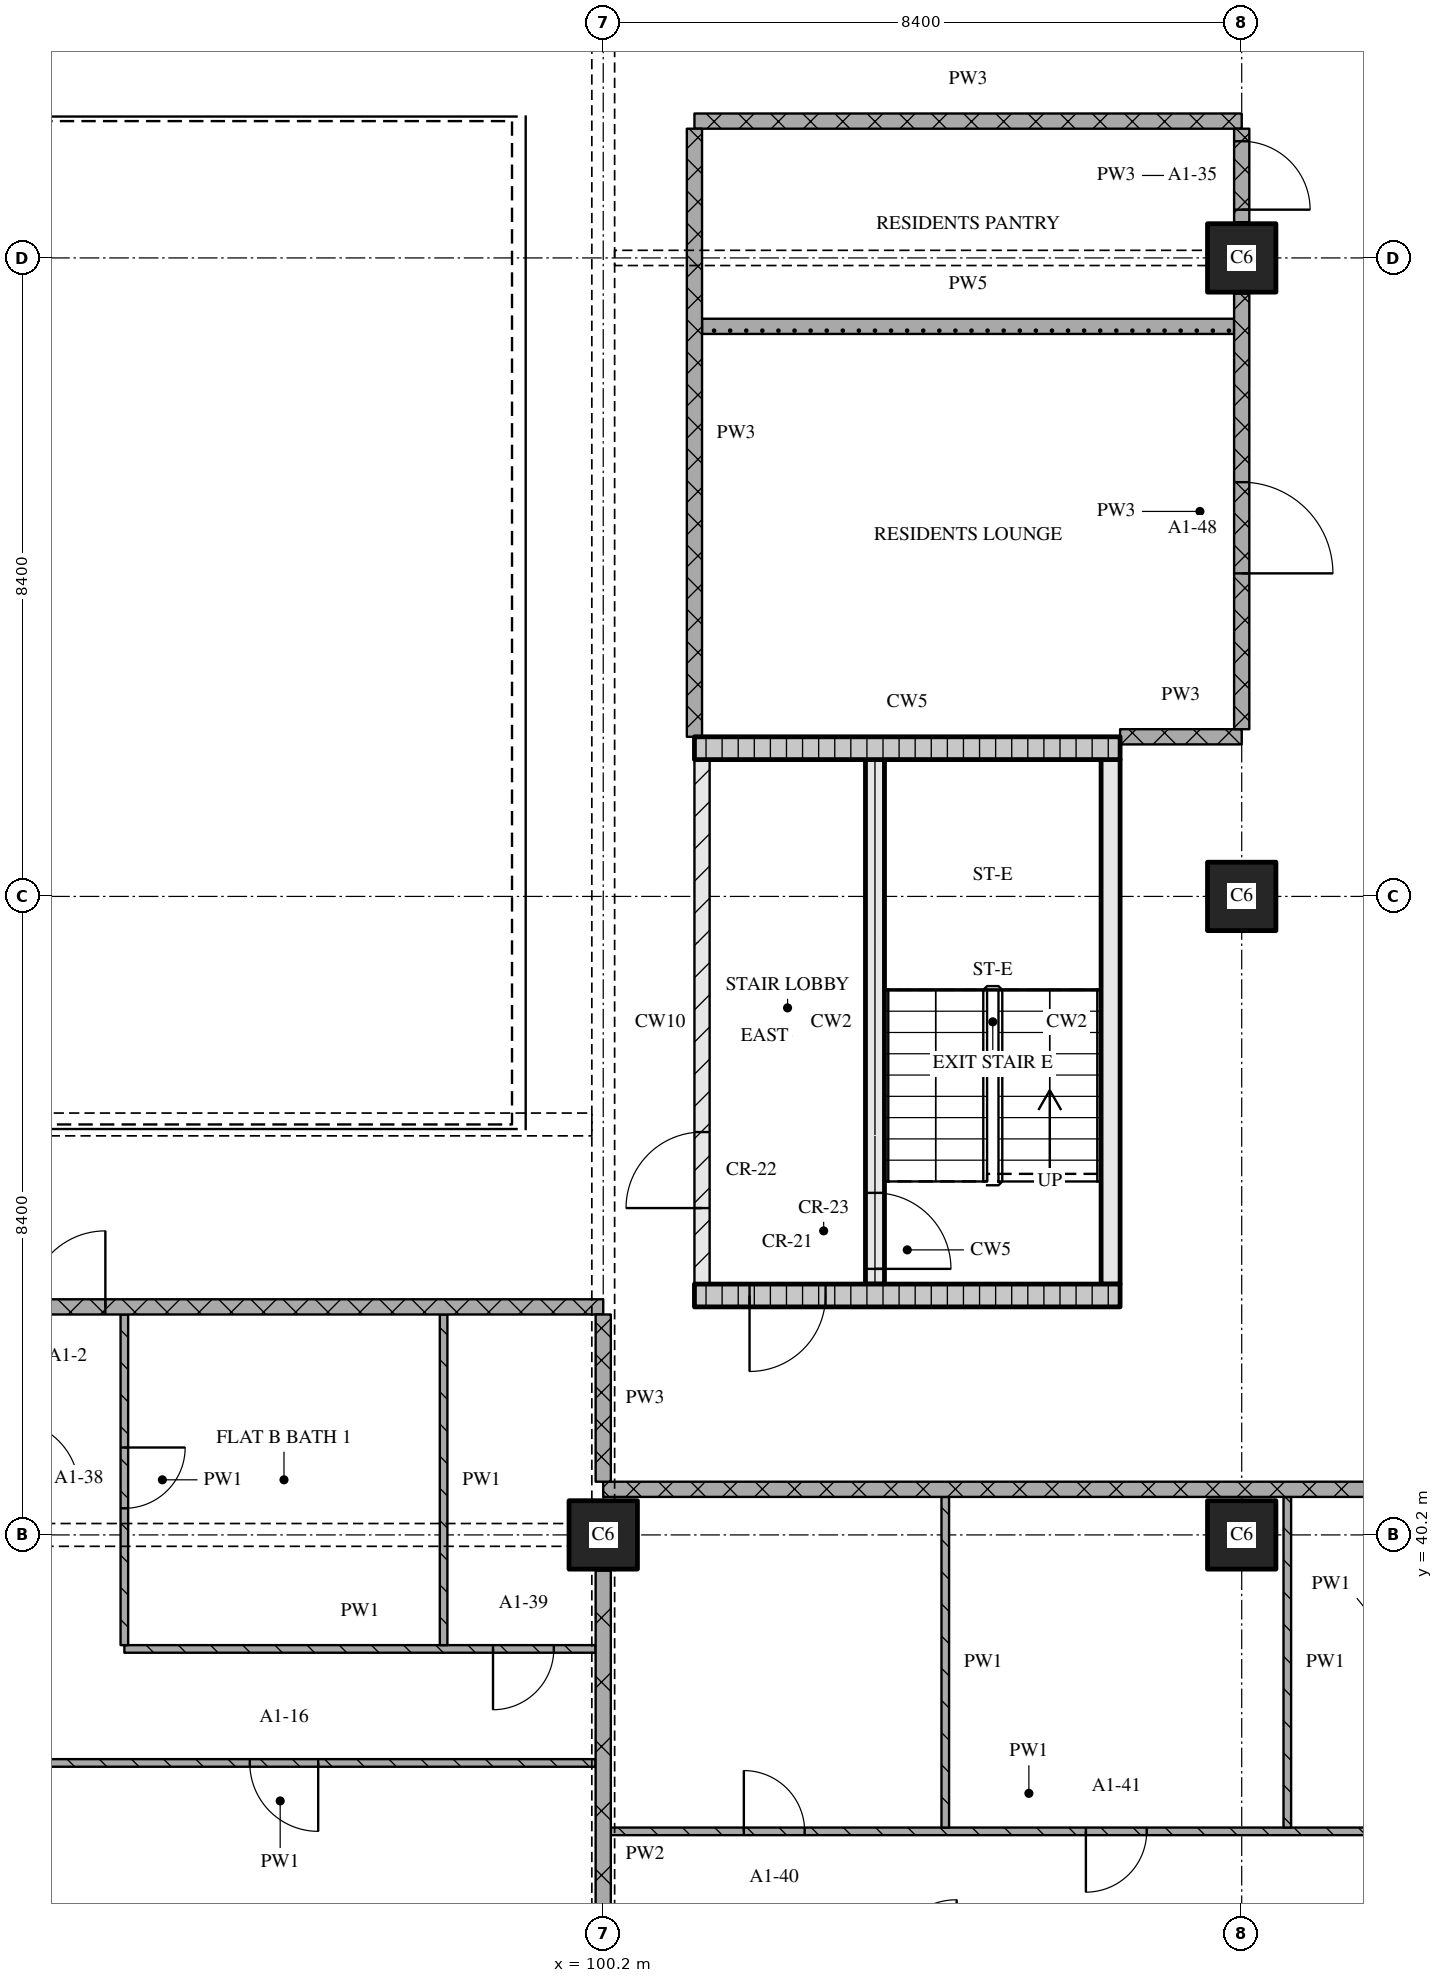
"""IFC4 building model, lengths in metres.
Left out: names, types, materials, properties, quantities, classifications, styles, units other than length and angle.
Written with IfcOpenShell. Run it as: python <this file> out.ifc"""

import sys

from ifc_helpers import new_model, si_unit, direction, frame, frame_2d, origin, origin_2d, place, context, subcontext, project, spatial, rectangle, extrude, element, fill, save


model = new_model("IFC4")
c1 = context("Model", 3, precision=1e-05, world=origin(), true_north=direction((0.0, 1.0)))
c2 = subcontext(c1, "Body", "Model", "MODEL_VIEW")
j1 = project(units=[si_unit("LENGTHUNIT", "METRE"), si_unit("PLANEANGLEUNIT", "RADIAN")], contexts=[c1])
p1 = place(None, origin())
s1 = spatial("IfcSite", under=j1, at=p1, CompositionType="ELEMENT")
p2 = place(p1, origin())
s2 = spatial("IfcBuilding", under=s1, at=p2, CompositionType="ELEMENT")
p3 = place(p2, frame((0.0, 0.0, 44.4)))
s3 = spatial("IfcBuildingStorey", under=s2, at=p3, CompositionType="ELEMENT", Elevation=44.4)
for number, where, z_axis, x_axis in (
    (1, (100.2, 40.2, 0.0), (0.0, 0.0, 1.0), (1.0, 0.0, 0.0)),
    (2, (108.6, 40.2, 0.0), (0.0, 0.0, 1.0), (1.0, 0.0, 0.0)),
    (3, (108.6, 48.6, 0.0), (0.0, 0.0, 1.0), (1.0, 0.0, 0.0)),
    (4, (108.6, 57.0, 0.0), (0.0, 0.0, 1.0), (1.0, 0.0, 0.0)),
):
    element("IfcColumn", number, at=place(p3, frame(where, z_axis=z_axis, x_axis=x_axis)), inside=s3, PredefinedType="COLUMN", context=c2, shape_type="SweptSolid", body=[
        extrude(rectangle(XDim=0.9, YDim=0.9, at=origin_2d()), origin(), (0.0, 0.0, 1.0), 3.6),
    ])
p4 = place(p3, frame((101.4, 43.35, 0.0), z_axis=(0.0, 0.0, 1.0), x_axis=(1.0, 0.0, 0.0)))
e5 = element("IfcWall", 5, at=p4, inside=s3, PredefinedType="SOLIDWALL", context=c2, shape_type="SweptSolid", body=[
    extrude(rectangle(XDim=5.6, YDim=0.3, at=frame_2d((2.8, 0.0))), origin(), (0.0, 0.0, 1.0), 3.32),
])
p5 = place(p4, frame((0.725, 0.0, 0.0)))
e6 = element("IfcOpeningElement", 6, at=p5, cuts=e5, PredefinedType="OPENING", context=c2, shape_type="SweptSolid", body=[
    extrude(rectangle(XDim=1.0, YDim=2.1, at=frame_2d((0.5, 1.05))), frame((0.0, 0.16, 0.0), z_axis=(0.0, -1.0, 0.0), x_axis=(1.0, 0.0, 0.0)), (0.0, 0.0, 1.0), 0.32),
])
p6 = place(p3, frame((101.5, 43.5, 0.0), z_axis=(0.0, 0.0, 1.0), x_axis=(0.0, 1.0, 0.0)))
e7 = element("IfcWall", 7, at=p6, inside=s3, PredefinedType="PARTITIONING", context=c2, shape_type="SweptSolid", body=[
    extrude(rectangle(XDim=6.9, YDim=0.2, at=frame_2d((3.45, 0.0))), origin(), (0.0, 0.0, 1.0), 3.32),
])
p7 = place(p6, frame((1.0, 0.0, 0.0)))
e8 = element("IfcOpeningElement", 8, at=p7, cuts=e7, PredefinedType="OPENING", context=c2, shape_type="SweptSolid", body=[
    extrude(rectangle(XDim=1.0, YDim=2.1, at=frame_2d((0.5, 1.05))), frame((0.0, 0.11, 0.0), z_axis=(0.0, -1.0, 0.0), x_axis=(1.0, 0.0, 0.0)), (0.0, 0.0, 1.0), 0.22),
])
p8 = place(p3, frame((103.775, 43.5, 0.0), z_axis=(0.0, 0.0, 1.0), x_axis=(0.0, 1.0, 0.0)))
e9 = element("IfcWall", 9, at=p8, inside=s3, PredefinedType="SOLIDWALL", context=c2, shape_type="SweptSolid", body=[
    extrude(rectangle(XDim=6.9, YDim=0.25, at=frame_2d((3.45, 0.0))), origin(), (0.0, 0.0, 1.0), 3.32),
])
p9 = place(p8, frame((0.2, 0.0, 0.0)))
e10 = element("IfcOpeningElement", 10, at=p9, cuts=e9, PredefinedType="OPENING", context=c2, shape_type="SweptSolid", body=[
    extrude(rectangle(XDim=1.0, YDim=2.1, at=frame_2d((0.5, 1.05))), frame((0.0, 0.135, 0.0), z_axis=(0.0, -1.0, 0.0), x_axis=(1.0, 0.0, 0.0)), (0.0, 0.0, 1.0), 0.27),
])
p10 = place(p3, frame((106.875, 43.5, 0.0), z_axis=(0.0, 0.0, 1.0), x_axis=(0.0, 1.0, 0.0)))
e11 = element("IfcWall", 11, at=p10, inside=s3, PredefinedType="SOLIDWALL", context=c2, shape_type="SweptSolid", body=[
    extrude(rectangle(XDim=6.9, YDim=0.25, at=frame_2d((3.45, 0.0))), origin(), (0.0, 0.0, 1.0), 3.32),
])
p11 = place(p3, frame((101.4, 50.55, 0.0), z_axis=(0.0, 0.0, 1.0), x_axis=(1.0, 0.0, 0.0)))
e12 = element("IfcWall", 12, at=p11, inside=s3, PredefinedType="SOLIDWALL", context=c2, shape_type="SweptSolid", body=[
    extrude(rectangle(XDim=5.6, YDim=0.3, at=frame_2d((2.8, 0.0))), origin(), (0.0, 0.0, 1.0), 3.32),
])
p12 = place(p3, frame((100.3, 36.3, 0.0), z_axis=(0.0, 0.0, 1.0), x_axis=(1.0, 0.0, 0.0)))
e13 = element("IfcWall", 13, at=p12, inside=s3, PredefinedType="PARTITIONING", context=c2, shape_type="SweptSolid", body=[
    extrude(rectangle(XDim=11.0, YDim=0.1, at=frame_2d((5.5, 0.0))), origin(), (0.0, 0.0, 1.0), 3.32),
])
p13 = place(p12, frame((1.75, 0.0, 0.0)))
e14 = element("IfcOpeningElement", 14, at=p13, cuts=e13, PredefinedType="OPENING", context=c2, shape_type="SweptSolid", body=[
    extrude(rectangle(XDim=0.8, YDim=2.1, at=frame_2d((0.4, 1.05))), frame((0.0, 0.06, 0.0), z_axis=(0.0, -1.0, 0.0), x_axis=(1.0, 0.0, 0.0)), (0.0, 0.0, 1.0), 0.12),
])
p14 = place(p12, frame((6.25, 0.0, 0.0)))
e15 = element("IfcOpeningElement", 15, at=p14, cuts=e13, PredefinedType="OPENING", context=c2, shape_type="SweptSolid", body=[
    extrude(rectangle(XDim=0.8, YDim=2.1, at=frame_2d((0.4, 1.05))), frame((0.0, 0.06, 0.0), z_axis=(0.0, -1.0, 0.0), x_axis=(1.0, 0.0, 0.0)), (0.0, 0.0, 1.0), 0.12),
])
p15 = place(p3, frame((100.1, 37.2, 0.0), z_axis=(0.0, 0.0, 1.0), x_axis=(-1.0, 0.0, 0.0)))
e16 = element("IfcWall", 16, at=p15, inside=s3, PredefinedType="PARTITIONING", context=c2, shape_type="SweptSolid", body=[
    extrude(rectangle(XDim=8.3, YDim=0.1, at=frame_2d((4.15, 0.0))), origin(), (0.0, 0.0, 1.0), 3.32),
])
p16 = place(p15, frame((3.65, 0.0, 0.0)))
e17 = element("IfcOpeningElement", 17, at=p16, cuts=e16, PredefinedType="OPENING", context=c2, shape_type="SweptSolid", body=[
    extrude(rectangle(XDim=0.9, YDim=2.1, at=frame_2d((0.45, 1.05))), frame((0.0, 0.06, 0.0), z_axis=(0.0, -1.0, 0.0), x_axis=(1.0, 0.0, 0.0)), (0.0, 0.0, 1.0), 0.12),
])
p17 = place(p3, frame((93.9, 38.7, 0.0), z_axis=(0.0, 0.0, 1.0), x_axis=(1.0, 0.0, 0.0)))
e18 = element("IfcWall", 18, at=p17, inside=s3, PredefinedType="PARTITIONING", context=c2, shape_type="SweptSolid", body=[
    extrude(rectangle(XDim=6.2, YDim=0.1, at=frame_2d((3.1, 0.0))), origin(), (0.0, 0.0, 1.0), 3.32),
])
p18 = place(p17, frame((4.85, 0.0, 0.0)))
e19 = element("IfcOpeningElement", 19, at=p18, cuts=e18, PredefinedType="OPENING", context=c2, shape_type="SweptSolid", body=[
    extrude(rectangle(XDim=0.8, YDim=2.1, at=frame_2d((0.4, 1.05))), frame((0.0, 0.06, 0.0), z_axis=(0.0, -1.0, 0.0), x_axis=(1.0, 0.0, 0.0)), (0.0, 0.0, 1.0), 0.12),
])
p19 = place(p3, frame((124.28, 40.8, 0.0), z_axis=(0.0, 0.0, 1.0), x_axis=(-1.0, 0.0, 0.0)))
e20 = element("IfcWall", 20, at=p19, inside=s3, PredefinedType="PARTITIONING", context=c2, shape_type="SweptSolid", body=[
    extrude(rectangle(XDim=24.08, YDim=0.2, at=frame_2d((12.04, 0.0))), origin(), (0.0, 0.0, 1.0), 3.32),
])
p20 = place(p19, frame((11.73, 0.0, 0.0)))
e21 = element("IfcOpeningElement", 21, at=p20, cuts=e20, PredefinedType="OPENING", context=c2, shape_type="SweptSolid", body=[
    extrude(rectangle(XDim=1.0, YDim=2.1, at=frame_2d((0.5, 1.05))), frame((0.0, 0.11, 0.0), z_axis=(0.0, -1.0, 0.0), x_axis=(1.0, 0.0, 0.0)), (0.0, 0.0, 1.0), 0.22),
])
p21 = place(p3, frame((100.2, 43.2, 0.0), z_axis=(0.0, 0.0, 1.0), x_axis=(-1.0, 0.0, 0.0)))
e22 = element("IfcWall", 22, at=p21, inside=s3, PredefinedType="PARTITIONING", context=c2, shape_type="SweptSolid", body=[
    extrude(rectangle(XDim=25.2, YDim=0.2, at=frame_2d((12.6, 0.0))), origin(), (0.0, 0.0, 1.0), 3.32),
])
p22 = place(p21, frame((6.55, 0.0, 0.0)))
e23 = element("IfcOpeningElement", 23, at=p22, cuts=e22, PredefinedType="OPENING", context=c2, shape_type="SweptSolid", body=[
    extrude(rectangle(XDim=1.0, YDim=2.1, at=frame_2d((0.5, 1.05))), frame((0.0, 0.11, 0.0), z_axis=(0.0, -1.0, 0.0), x_axis=(1.0, 0.0, 0.0)), (0.0, 0.0, 1.0), 0.22),
])
p23 = place(p3, frame((107.0, 50.7, 0.0), z_axis=(0.0, 0.0, 1.0), x_axis=(1.0, 0.0, 0.0)))
e24 = element("IfcWall", 24, at=p23, inside=s3, PredefinedType="PARTITIONING", context=c2, shape_type="SweptSolid", body=[
    extrude(rectangle(XDim=1.6, YDim=0.2, at=frame_2d((0.8, 0.0))), origin(), (0.0, 0.0, 1.0), 3.32),
])
p24 = place(p3, frame((101.5, 56.1, 0.0), z_axis=(0.0, 0.0, 1.0), x_axis=(1.0, 0.0, 0.0)))
e25 = element("IfcWall", 25, at=p24, inside=s3, PredefinedType="PARTITIONING", context=c2, shape_type="SweptSolid", body=[
    extrude(rectangle(XDim=7.0, YDim=0.2, at=frame_2d((3.5, 0.0))), origin(), (0.0, 0.0, 1.0), 3.32),
])
p25 = place(p3, frame((101.4, 58.8, 0.0), z_axis=(0.0, 0.0, 1.0), x_axis=(1.0, 0.0, 0.0)))
e26 = element("IfcWall", 26, at=p25, inside=s3, PredefinedType="PARTITIONING", context=c2, shape_type="SweptSolid", body=[
    extrude(rectangle(XDim=7.2, YDim=0.2, at=frame_2d((3.6, 0.0))), origin(), (0.0, 0.0, 1.0), 3.32),
])
p26 = place(p3, frame((93.9, 43.1, 0.0), z_axis=(0.0, 0.0, 1.0), x_axis=(0.0, -1.0, 0.0)))
e27 = element("IfcWall", 27, at=p26, inside=s3, PredefinedType="PARTITIONING", context=c2, shape_type="SweptSolid", body=[
    extrude(rectangle(XDim=4.35, YDim=0.1, at=frame_2d((2.175, 0.0))), origin(), (0.0, 0.0, 1.0), 3.32),
])
p27 = place(p26, frame((1.75, 0.0, 0.0)))
e28 = element("IfcOpeningElement", 28, at=p27, cuts=e27, PredefinedType="OPENING", context=c2, shape_type="SweptSolid", body=[
    extrude(rectangle(XDim=0.8, YDim=2.1, at=frame_2d((0.4, 1.05))), frame((0.0, 0.06, 0.0), z_axis=(0.0, -1.0, 0.0), x_axis=(1.0, 0.0, 0.0)), (0.0, 0.0, 1.0), 0.12),
])
p28 = place(p3, frame((98.1, 43.1, 0.0), z_axis=(0.0, 0.0, 1.0), x_axis=(0.0, -1.0, 0.0)))
e29 = element("IfcWall", 29, at=p28, inside=s3, PredefinedType="PARTITIONING", context=c2, shape_type="SweptSolid", body=[
    extrude(rectangle(XDim=4.35, YDim=0.1, at=frame_2d((2.175, 0.0))), origin(), (0.0, 0.0, 1.0), 3.32),
])
p29 = place(p3, frame((100.2, 43.1, 0.0), z_axis=(0.0, 0.0, 1.0), x_axis=(0.0, -1.0, 0.0)))
e30 = element("IfcWall", 30, at=p29, inside=s3, PredefinedType="PARTITIONING", context=c2, shape_type="SweptSolid", body=[
    extrude(rectangle(XDim=2.2, YDim=0.2, at=frame_2d((1.1, 0.0))), origin(), (0.0, 0.0, 1.0), 2.43),
])
p30 = place(p3, frame((100.2, 39.73, 0.0), z_axis=(0.0, 0.0, 1.0), x_axis=(0.0, -1.0, 0.0)))
e31 = element("IfcWall", 31, at=p30, inside=s3, PredefinedType="PARTITIONING", context=c2, shape_type="SweptSolid", body=[
    extrude(rectangle(XDim=7.46, YDim=0.2, at=frame_2d((3.73, 0.0))), origin(), (0.0, 0.0, 1.0), 2.83),
])
p31 = place(p3, frame((101.4, 58.7, 0.0), z_axis=(0.0, 0.0, 1.0), x_axis=(0.0, -1.0, 0.0)))
e32 = element("IfcWall", 32, at=p31, inside=s3, PredefinedType="PARTITIONING", context=c2, shape_type="SweptSolid", body=[
    extrude(rectangle(XDim=8.0, YDim=0.2, at=frame_2d((4.0, 0.0))), origin(), (0.0, 0.0, 1.0), 3.32),
])
p32 = place(p3, frame((104.7, 40.7, 0.0), z_axis=(0.0, 0.0, 1.0), x_axis=(0.0, -1.0, 0.0)))
e33 = element("IfcWall", 33, at=p32, inside=s3, PredefinedType="PARTITIONING", context=c2, shape_type="SweptSolid", body=[
    extrude(rectangle(XDim=4.35, YDim=0.1, at=frame_2d((2.175, 0.0))), origin(), (0.0, 0.0, 1.0), 3.32),
])
p33 = place(p3, frame((108.6, 50.8, 0.0), z_axis=(0.0, 0.0, 1.0), x_axis=(0.0, 1.0, 0.0)))
e34 = element("IfcWall", 34, at=p33, inside=s3, PredefinedType="PARTITIONING", context=c2, shape_type="SweptSolid", body=[
    extrude(rectangle(XDim=5.73, YDim=0.2, at=frame_2d((2.865, 0.0))), origin(), (0.0, 0.0, 1.0), 3.32),
])
p34 = place(p33, frame((2.05, 0.0, 0.0)))
e35 = element("IfcOpeningElement", 35, at=p34, cuts=e34, PredefinedType="OPENING", context=c2, shape_type="SweptSolid", body=[
    extrude(rectangle(XDim=1.2, YDim=2.1, at=frame_2d((0.6, 1.05))), frame((0.0, 0.11, 0.0), z_axis=(0.0, -1.0, 0.0), x_axis=(1.0, 0.0, 0.0)), (0.0, 0.0, 1.0), 0.22),
])
p35 = place(p3, frame((108.6, 57.47, 0.0), z_axis=(0.0, 0.0, 1.0), x_axis=(0.0, 1.0, 0.0)))
e36 = element("IfcWall", 36, at=p35, inside=s3, PredefinedType="PARTITIONING", context=c2, shape_type="SweptSolid", body=[
    extrude(rectangle(XDim=1.23, YDim=0.2, at=frame_2d((0.615, 0.0))), origin(), (0.0, 0.0, 1.0), 3.32),
])
p36 = place(p35, frame((0.165, 0.0, 0.0)))
e37 = element("IfcOpeningElement", 37, at=p36, cuts=e36, PredefinedType="OPENING", context=c2, shape_type="SweptSolid", body=[
    extrude(rectangle(XDim=0.9, YDim=2.1, at=frame_2d((0.45, 1.05))), frame((0.0, 0.11, 0.0), z_axis=(0.0, -1.0, 0.0), x_axis=(1.0, 0.0, 0.0)), (0.0, 0.0, 1.0), 0.22),
])
p37 = place(p3, frame((109.2, 40.7, 0.0), z_axis=(0.0, 0.0, 1.0), x_axis=(0.0, -1.0, 0.0)))
e38 = element("IfcWall", 38, at=p37, inside=s3, PredefinedType="PARTITIONING", context=c2, shape_type="SweptSolid", body=[
    extrude(rectangle(XDim=4.35, YDim=0.1, at=frame_2d((2.175, 0.0))), origin(), (0.0, 0.0, 1.0), 3.32),
])
p38 = place(p5, origin())
e39 = element("IfcDoor", 39, at=p38, inside=s3, OperationType="SINGLE_SWING_RIGHT", PredefinedType="DOOR", context=c2, shape_type="SweptSolid", body=[
    extrude(rectangle(XDim=1.0, YDim=2.1, at=frame_2d((0.5, 1.05))), frame((0.0, 0.025, 0.0), z_axis=(0.0, -1.0, 0.0), x_axis=(1.0, 0.0, 0.0)), (0.0, 0.0, 1.0), 0.05),
])
fill(e6, e39)
p39 = place(p9, origin())
e40 = element("IfcDoor", 40, at=p39, inside=s3, OperationType="SINGLE_SWING_RIGHT", PredefinedType="DOOR", context=c2, shape_type="SweptSolid", body=[
    extrude(rectangle(XDim=1.0, YDim=2.1, at=frame_2d((0.5, 1.05))), frame((0.0, 0.025, 0.0), z_axis=(0.0, -1.0, 0.0), x_axis=(1.0, 0.0, 0.0)), (0.0, 0.0, 1.0), 0.05),
])
fill(e10, e40)
p40 = place(p7, origin())
e41 = element("IfcDoor", 41, at=p40, inside=s3, OperationType="SINGLE_SWING_LEFT", PredefinedType="DOOR", context=c2, shape_type="SweptSolid", body=[
    extrude(rectangle(XDim=1.0, YDim=2.1, at=frame_2d((0.5, 1.05))), frame((0.0, 0.025, 0.0), z_axis=(0.0, -1.0, 0.0), x_axis=(1.0, 0.0, 0.0)), (0.0, 0.0, 1.0), 0.05),
])
fill(e8, e41)
p41 = place(p13, origin())
e42 = element("IfcDoor", 42, at=p41, inside=s3, OperationType="SINGLE_SWING_LEFT", PredefinedType="DOOR", context=c2, shape_type="SweptSolid", body=[
    extrude(rectangle(XDim=0.8, YDim=2.1, at=frame_2d((0.4, 1.05))), frame((0.0, 0.025, 0.0), z_axis=(0.0, -1.0, 0.0), x_axis=(1.0, 0.0, 0.0)), (0.0, 0.0, 1.0), 0.05),
])
fill(e14, e42)
p42 = place(p14, origin())
e43 = element("IfcDoor", 43, at=p42, inside=s3, OperationType="SINGLE_SWING_RIGHT", PredefinedType="DOOR", context=c2, shape_type="SweptSolid", body=[
    extrude(rectangle(XDim=0.8, YDim=2.1, at=frame_2d((0.4, 1.05))), frame((0.0, 0.025, 0.0), z_axis=(0.0, -1.0, 0.0), x_axis=(1.0, 0.0, 0.0)), (0.0, 0.0, 1.0), 0.05),
])
fill(e15, e43)
p43 = place(p16, origin())
e44 = element("IfcDoor", 44, at=p43, inside=s3, OperationType="SINGLE_SWING_LEFT", PredefinedType="DOOR", context=c2, shape_type="SweptSolid", body=[
    extrude(rectangle(XDim=0.9, YDim=2.1, at=frame_2d((0.45, 1.05))), frame((0.0, 0.025, 0.0), z_axis=(0.0, -1.0, 0.0), x_axis=(1.0, 0.0, 0.0)), (0.0, 0.0, 1.0), 0.05),
])
fill(e17, e44)
p44 = place(p18, origin())
e45 = element("IfcDoor", 45, at=p44, inside=s3, OperationType="SINGLE_SWING_RIGHT", PredefinedType="DOOR", context=c2, shape_type="SweptSolid", body=[
    extrude(rectangle(XDim=0.8, YDim=2.1, at=frame_2d((0.4, 1.05))), frame((0.0, 0.025, 0.0), z_axis=(0.0, -1.0, 0.0), x_axis=(1.0, 0.0, 0.0)), (0.0, 0.0, 1.0), 0.05),
])
fill(e19, e45)
p45 = place(p22, origin())
e46 = element("IfcDoor", 46, at=p45, inside=s3, OperationType="SINGLE_SWING_RIGHT", PredefinedType="DOOR", context=c2, shape_type="SweptSolid", body=[
    extrude(rectangle(XDim=1.0, YDim=2.1, at=frame_2d((0.5, 1.05))), frame((0.0, 0.025, 0.0), z_axis=(0.0, -1.0, 0.0), x_axis=(1.0, 0.0, 0.0)), (0.0, 0.0, 1.0), 0.05),
])
fill(e23, e46)
p46 = place(p27, origin())
e47 = element("IfcDoor", 47, at=p46, inside=s3, OperationType="SINGLE_SWING_LEFT", PredefinedType="DOOR", context=c2, shape_type="SweptSolid", body=[
    extrude(rectangle(XDim=0.8, YDim=2.1, at=frame_2d((0.4, 1.05))), frame((0.0, 0.025, 0.0), z_axis=(0.0, -1.0, 0.0), x_axis=(1.0, 0.0, 0.0)), (0.0, 0.0, 1.0), 0.05),
])
fill(e28, e47)
p47 = place(p34, origin())
e48 = element("IfcDoor", 48, at=p47, inside=s3, OperationType="SINGLE_SWING_RIGHT", PredefinedType="DOOR", context=c2, shape_type="SweptSolid", body=[
    extrude(rectangle(XDim=1.2, YDim=2.1, at=frame_2d((0.6, 1.05))), frame((0.0, 0.025, 0.0), z_axis=(0.0, -1.0, 0.0), x_axis=(1.0, 0.0, 0.0)), (0.0, 0.0, 1.0), 0.05),
])
fill(e35, e48)
p48 = place(p36, origin())
e49 = element("IfcDoor", 49, at=p48, inside=s3, OperationType="SINGLE_SWING_RIGHT", PredefinedType="DOOR", context=c2, shape_type="SweptSolid", body=[
    extrude(rectangle(XDim=0.9, YDim=2.1, at=frame_2d((0.45, 1.05))), frame((0.0, 0.025, 0.0), z_axis=(0.0, -1.0, 0.0), x_axis=(1.0, 0.0, 0.0)), (0.0, 0.0, 1.0), 0.05),
])
fill(e37, e49)
save(model, sys.argv[1])
